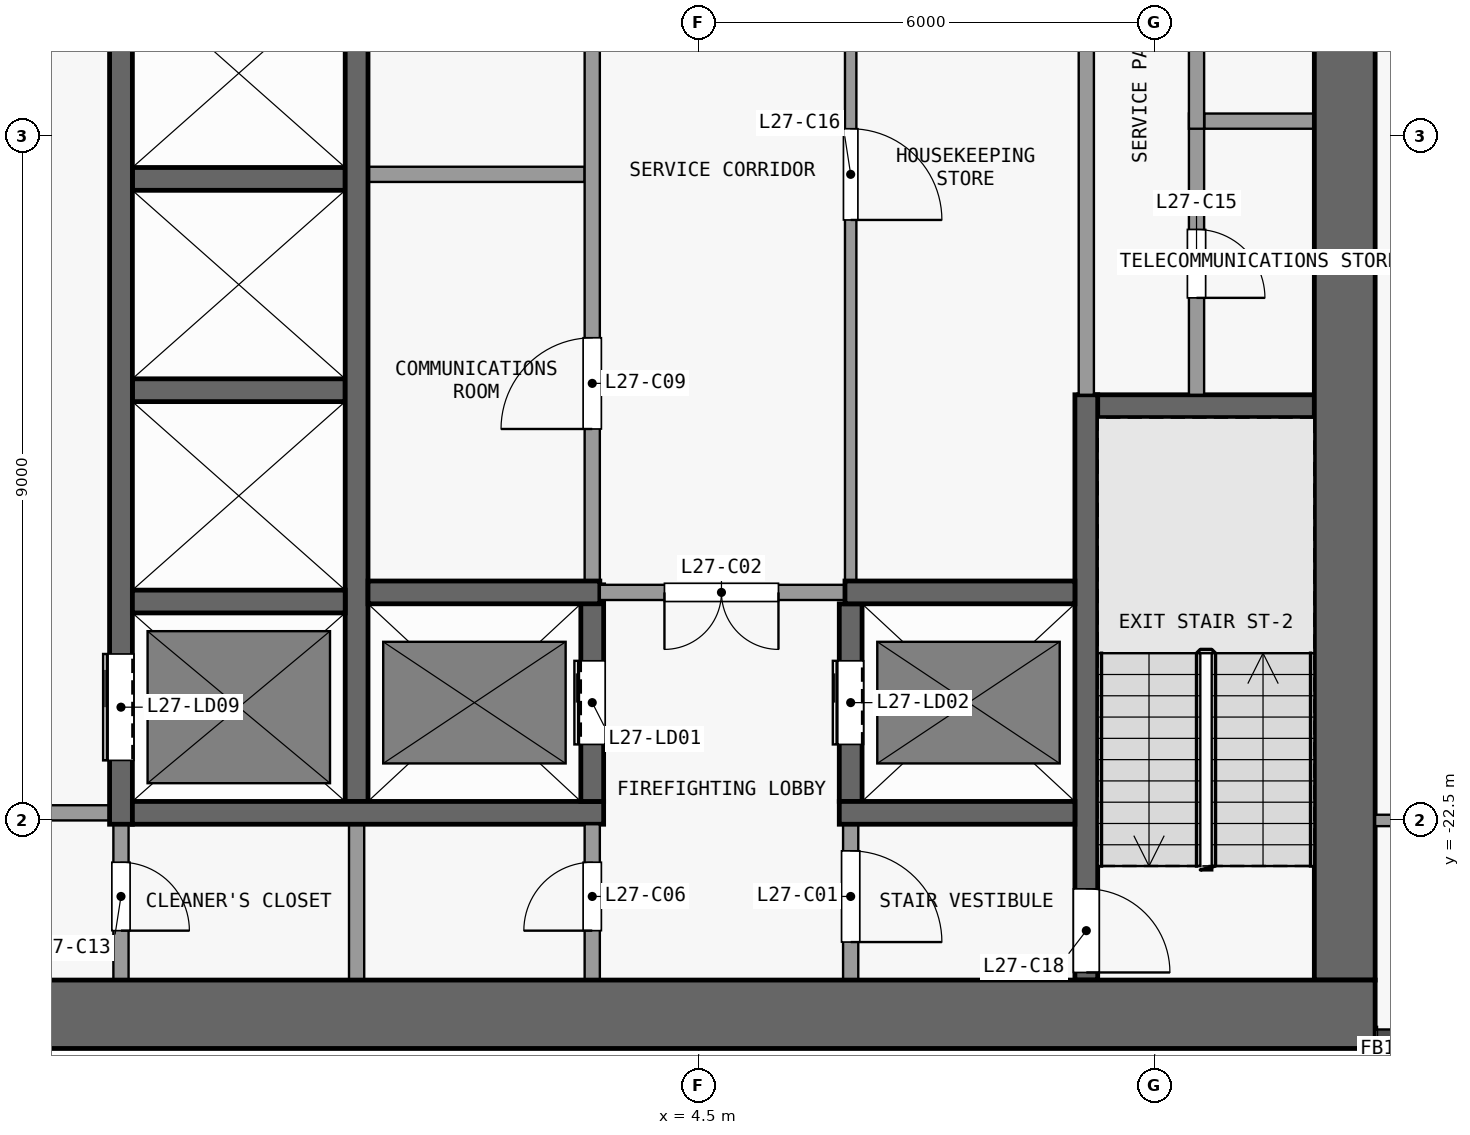
"""IFC4 building model, lengths in metres.
Left out: names, types, materials, properties, quantities, classifications, styles, units other than length and angle.
Written with IfcOpenShell. Run it as: python <this file> out.ifc"""

import sys

from ifc_helpers import new_model, si_unit, direction, frame, frame_2d, origin, place, context, subcontext, project, spatial, rectangle, extrude, element, fill, save


model = new_model("IFC4")
c1 = context("Model", 3, precision=1e-05, world=origin(), true_north=direction((0.0, 1.0)))
c2 = subcontext(c1, "Body", "Model", "MODEL_VIEW")
j1 = project(units=[si_unit("LENGTHUNIT", "METRE"), si_unit("PLANEANGLEUNIT", "RADIAN")], contexts=[c1])
p1 = place(None, origin())
s1 = spatial("IfcSite", under=j1, at=p1, CompositionType="ELEMENT")
p2 = place(p1, origin())
s2 = spatial("IfcBuilding", under=s1, at=p2, CompositionType="ELEMENT")
p3 = place(p2, frame((0.0, 0.0, 109.9)))
s3 = spatial("IfcBuildingStorey", under=s2, at=p3, CompositionType="ELEMENT", Elevation=109.9)
p4 = place(p3, frame((-13.4, -25.05, 0.0), z_axis=(0.0, 0.0, 1.0), x_axis=(1.0, 0.0, 0.0)))
e1 = element("IfcWall", 1, at=p4, inside=s3, PredefinedType="SHEAR", context=c2, shape_type="SweptSolid", body=[
    extrude(rectangle(XDim=26.8, YDim=0.9, at=frame_2d((13.4, 0.0))), origin(), (0.0, 0.0, 1.0), 3.3),
])
p5 = place(p3, frame((13.0, -24.6, 0.0), z_axis=(0.0, 0.0, 1.0), x_axis=(0.0, 1.0, 0.0)))
e2 = element("IfcWall", 2, at=p5, inside=s3, PredefinedType="SHEAR", context=c2, shape_type="SweptSolid", body=[
    extrude(rectangle(XDim=16.1, YDim=0.8, at=frame_2d((8.05, 0.0))), origin(), (0.0, 0.0, 1.0), 3.3),
])
p6 = place(p3, frame((-3.25, -22.4, 0.0), z_axis=(0.0, 0.0, 1.0), x_axis=(-1.0, 0.0, 0.0)))
e3 = element("IfcWall", 3, at=p6, inside=s3, PredefinedType="PARTITIONING", context=c2, shape_type="SweptSolid", body=[
    extrude(rectangle(XDim=3.1, YDim=0.2, at=frame_2d((1.55, 0.0))), origin(), (0.0, 0.0, 1.0), 3.3),
])
p7 = place(p6, frame((0.8, 0.0, 0.0)))
e4 = element("IfcOpeningElement", 4, at=p7, cuts=e3, PredefinedType="OPENING", context=c2, shape_type="SweptSolid", body=[
    extrude(rectangle(XDim=1.5, YDim=2.1, at=frame_2d((0.75, 1.05))), frame((0.0, 0.11, 0.0), z_axis=(0.0, -1.0, 0.0), x_axis=(1.0, 0.0, 0.0)), (0.0, 0.0, 1.0), 0.22),
])
p8 = place(p3, frame((-2.95, -22.4, 0.0), z_axis=(0.0, 0.0, 1.0), x_axis=(1.0, 0.0, 0.0)))
e5 = element("IfcWall", 5, at=p8, inside=s3, PredefinedType="SHEAR", context=c2, shape_type="SweptSolid", body=[
    extrude(rectangle(XDim=6.2, YDim=0.3, at=frame_2d((3.1, 0.0))), origin(), (0.0, 0.0, 1.0), 3.3),
])
p9 = place(p3, frame((6.35, -22.4, 0.0), z_axis=(0.0, 0.0, 1.0), x_axis=(1.0, 0.0, 0.0)))
e6 = element("IfcWall", 6, at=p9, inside=s3, PredefinedType="SHEAR", context=c2, shape_type="SweptSolid", body=[
    extrude(rectangle(XDim=3.1, YDim=0.3, at=frame_2d((1.55, 0.0))), origin(), (0.0, 0.0, 1.0), 3.3),
])
p10 = place(p3, frame((-2.95, -19.62, 0.0), z_axis=(0.0, 0.0, 1.0), x_axis=(1.0, 0.0, 0.0)))
e7 = element("IfcWall", 7, at=p10, inside=s3, PredefinedType="SHEAR", context=c2, shape_type="SweptSolid", body=[
    extrude(rectangle(XDim=2.8, YDim=0.3, at=frame_2d((1.4, 0.0))), origin(), (0.0, 0.0, 1.0), 3.3),
])
p11 = place(p3, frame((0.15, -19.5, 0.0), z_axis=(0.0, 0.0, 1.0), x_axis=(1.0, 0.0, 0.0)))
e8 = element("IfcWall", 8, at=p11, inside=s3, PredefinedType="SHEAR", context=c2, shape_type="SweptSolid", body=[
    extrude(rectangle(XDim=3.05, YDim=0.3, at=frame_2d((1.525, 0.0))), origin(), (0.0, 0.0, 1.0), 3.3),
])
p12 = place(p3, frame((6.575, -19.5, 0.0), z_axis=(0.0, 0.0, 1.0), x_axis=(-1.0, 0.0, 0.0)))
e9 = element("IfcWall", 9, at=p12, inside=s3, PredefinedType="PARTITIONING", context=c2, shape_type="SweptSolid", body=[
    extrude(rectangle(XDim=3.375, YDim=0.2, at=frame_2d((1.688, 0.0))), origin(), (0.0, 0.0, 1.0), 3.3),
])
p13 = place(p12, frame((1.025, 0.0, 0.0)))
e10 = element("IfcOpeningElement", 10, at=p13, cuts=e9, PredefinedType="OPENING", context=c2, shape_type="SweptSolid", body=[
    extrude(rectangle(XDim=1.5, YDim=2.1, at=frame_2d((0.75, 1.05))), frame((0.0, 0.11, 0.0), z_axis=(0.0, -1.0, 0.0), x_axis=(1.0, 0.0, 0.0)), (0.0, 0.0, 1.0), 0.22),
])
p14 = place(p3, frame((6.425, -19.5, 0.0), z_axis=(0.0, 0.0, 1.0), x_axis=(1.0, 0.0, 0.0)))
e11 = element("IfcWall", 11, at=p14, inside=s3, PredefinedType="SHEAR", context=c2, shape_type="SweptSolid", body=[
    extrude(rectangle(XDim=3.025, YDim=0.3, at=frame_2d((1.512, 0.0))), origin(), (0.0, 0.0, 1.0), 3.3),
])
p15 = place(p3, frame((9.5, -17.05, 0.0), z_axis=(0.0, 0.0, 1.0), x_axis=(1.0, 0.0, 0.0)))
e12 = element("IfcWall", 12, at=p15, inside=s3, PredefinedType="SHEAR", context=c2, shape_type="SweptSolid", body=[
    extrude(rectangle(XDim=3.1, YDim=0.3, at=frame_2d((1.55, 0.0))), origin(), (0.0, 0.0, 1.0), 3.3),
])
for number, where, z_axis, x_axis in (
    (13, (-2.95, -16.84, 0.0), (0.0, 0.0, 1.0), (1.0, 0.0, 0.0)),
    (14, (-2.95, -14.06, 0.0), (0.0, 0.0, 1.0), (1.0, 0.0, 0.0)),
):
    element("IfcWall", number, at=place(p3, frame(where, z_axis=z_axis, x_axis=x_axis)), inside=s3, PredefinedType="SHEAR", context=c2, shape_type="SweptSolid", body=[
        extrude(rectangle(XDim=2.8, YDim=0.3, at=frame_2d((1.4, 0.0))), origin(), (0.0, 0.0, 1.0), 3.3),
    ])
p16 = place(p3, frame((0.15, -14.0, 0.0), z_axis=(0.0, 0.0, 1.0), x_axis=(1.0, 0.0, 0.0)))
e15 = element("IfcWall", 15, at=p16, inside=s3, PredefinedType="PARTITIONING", context=c2, shape_type="SweptSolid", body=[
    extrude(rectangle(XDim=2.85, YDim=0.2, at=frame_2d((1.425, 0.0))), origin(), (0.0, 0.0, 1.0), 3.3),
])
p17 = place(p3, frame((11.15, -13.3, 0.0), z_axis=(0.0, 0.0, 1.0), x_axis=(1.0, 0.0, 0.0)))
e16 = element("IfcWall", 16, at=p17, inside=s3, PredefinedType="PARTITIONING", context=c2, shape_type="SweptSolid", body=[
    extrude(rectangle(XDim=1.45, YDim=0.2, at=frame_2d((0.725, 0.0))), origin(), (0.0, 0.0, 1.0), 3.3),
])
p18 = place(p3, frame((-3.1, -22.55, 0.0), z_axis=(0.0, 0.0, 1.0), x_axis=(0.0, -1.0, 0.0)))
e17 = element("IfcWall", 17, at=p18, inside=s3, PredefinedType="PARTITIONING", context=c2, shape_type="SweptSolid", body=[
    extrude(rectangle(XDim=2.05, YDim=0.2, at=frame_2d((1.025, 0.0))), origin(), (0.0, 0.0, 1.0), 3.3),
])
p19 = place(p18, frame((0.5, 0.0, 0.0)))
e18 = element("IfcOpeningElement", 18, at=p19, cuts=e17, PredefinedType="OPENING", context=c2, shape_type="SweptSolid", body=[
    extrude(rectangle(XDim=0.9, YDim=2.1, at=frame_2d((0.45, 1.05))), frame((0.0, 0.11, 0.0), z_axis=(0.0, -1.0, 0.0), x_axis=(1.0, 0.0, 0.0)), (0.0, 0.0, 1.0), 0.22),
])
p20 = place(p3, frame((-3.1, -22.55, 0.0), z_axis=(0.0, 0.0, 1.0), x_axis=(0.0, 1.0, 0.0)))
e19 = element("IfcWall", 19, at=p20, inside=s3, PredefinedType="SHEAR", context=c2, shape_type="SweptSolid", body=[
    extrude(rectangle(XDim=14.05, YDim=0.3, at=frame_2d((7.025, 0.0))), origin(), (0.0, 0.0, 1.0), 3.3),
])
p21 = place(p20, frame((12.11, 0.0, 0.0)))
e20 = element("IfcOpeningElement", 20, at=p21, cuts=e19, PredefinedType="OPENING", context=c2, shape_type="SweptSolid", body=[
    extrude(rectangle(XDim=1.1, YDim=2.1, at=frame_2d((0.55, 1.05))), frame((0.0, 0.16, 0.0), z_axis=(0.0, -1.0, 0.0), x_axis=(1.0, 0.0, 0.0)), (0.0, 0.0, 1.0), 0.32),
])
p22 = place(p20, frame((0.84, 0.0, 0.0)))
e21 = element("IfcOpeningElement", 21, at=p22, cuts=e19, PredefinedType="OPENING", context=c2, shape_type="SweptSolid", body=[
    extrude(rectangle(XDim=1.4, YDim=2.1, at=frame_2d((0.7, 1.05))), frame((0.0, 0.16, 0.0), z_axis=(0.0, -1.0, 0.0), x_axis=(1.0, 0.0, 0.0)), (0.0, 0.0, 1.0), 0.32),
])
p23 = place(p3, frame((0.0, -24.6, 0.0), z_axis=(0.0, 0.0, 1.0), x_axis=(0.0, 1.0, 0.0)))
e22 = element("IfcWall", 22, at=p23, inside=s3, PredefinedType="PARTITIONING", context=c2, shape_type="SweptSolid", body=[
    extrude(rectangle(XDim=2.05, YDim=0.2, at=frame_2d((1.025, 0.0))), origin(), (0.0, 0.0, 1.0), 3.3),
])
p24 = place(p3, frame((0.0, -22.25, 0.0), z_axis=(0.0, 0.0, 1.0), x_axis=(0.0, 1.0, 0.0)))
e23 = element("IfcWall", 23, at=p24, inside=s3, PredefinedType="SHEAR", context=c2, shape_type="SweptSolid", body=[
    extrude(rectangle(XDim=13.75, YDim=0.3, at=frame_2d((6.875, 0.0))), origin(), (0.0, 0.0, 1.0), 3.3),
])
p25 = place(p3, frame((3.1, -24.6, 0.0), z_axis=(0.0, 0.0, 1.0), x_axis=(0.0, 1.0, 0.0)))
e24 = element("IfcWall", 24, at=p25, inside=s3, PredefinedType="PARTITIONING", context=c2, shape_type="SweptSolid", body=[
    extrude(rectangle(XDim=2.05, YDim=0.2, at=frame_2d((1.025, 0.0))), origin(), (0.0, 0.0, 1.0), 3.3),
])
p26 = place(p25, frame((0.65, 0.0, 0.0)))
e25 = element("IfcOpeningElement", 25, at=p26, cuts=e24, PredefinedType="OPENING", context=c2, shape_type="SweptSolid", body=[
    extrude(rectangle(XDim=0.9, YDim=2.1, at=frame_2d((0.45, 1.05))), frame((0.0, 0.11, 0.0), z_axis=(0.0, -1.0, 0.0), x_axis=(1.0, 0.0, 0.0)), (0.0, 0.0, 1.0), 0.22),
])
p27 = place(p3, frame((3.1, -22.25, 0.0), z_axis=(0.0, 0.0, 1.0), x_axis=(0.0, 1.0, 0.0)))
e26 = element("IfcWall", 26, at=p27, inside=s3, PredefinedType="SHEAR", context=c2, shape_type="SweptSolid", body=[
    extrude(rectangle(XDim=2.85, YDim=0.3, at=frame_2d((1.425, 0.0))), origin(), (0.0, 0.0, 1.0), 3.3),
])
p28 = place(p27, frame((0.75, 0.0, 0.0)))
e27 = element("IfcOpeningElement", 27, at=p28, cuts=e26, PredefinedType="OPENING", context=c2, shape_type="SweptSolid", body=[
    extrude(rectangle(XDim=1.1, YDim=2.1, at=frame_2d((0.55, 1.05))), frame((0.0, 0.16, 0.0), z_axis=(0.0, -1.0, 0.0), x_axis=(1.0, 0.0, 0.0)), (0.0, 0.0, 1.0), 0.32),
])
p29 = place(p3, frame((3.1, -19.6, 0.0), z_axis=(0.0, 0.0, 1.0), x_axis=(0.0, 1.0, 0.0)))
e28 = element("IfcWall", 28, at=p29, inside=s3, PredefinedType="PARTITIONING", context=c2, shape_type="SweptSolid", body=[
    extrude(rectangle(XDim=11.1, YDim=0.2, at=frame_2d((5.55, 0.0))), origin(), (0.0, 0.0, 1.0), 3.3),
])
p30 = place(p29, frame((2.25, 0.0, 0.0)))
e29 = element("IfcOpeningElement", 29, at=p30, cuts=e28, PredefinedType="OPENING", context=c2, shape_type="SweptSolid", body=[
    extrude(rectangle(XDim=1.2, YDim=2.1, at=frame_2d((0.6, 1.05))), frame((0.0, 0.11, 0.0), z_axis=(0.0, -1.0, 0.0), x_axis=(1.0, 0.0, 0.0)), (0.0, 0.0, 1.0), 0.22),
])
p31 = place(p29, frame((7.75, 0.0, 0.0)))
e30 = element("IfcOpeningElement", 30, at=p31, cuts=e28, PredefinedType="OPENING", context=c2, shape_type="SweptSolid", body=[
    extrude(rectangle(XDim=1.2, YDim=2.1, at=frame_2d((0.6, 1.05))), frame((0.0, 0.11, 0.0), z_axis=(0.0, -1.0, 0.0), x_axis=(1.0, 0.0, 0.0)), (0.0, 0.0, 1.0), 0.22),
])
p32 = place(p3, frame((6.5, -22.55, 0.0), z_axis=(0.0, 0.0, 1.0), x_axis=(0.0, -1.0, 0.0)))
e31 = element("IfcWall", 31, at=p32, inside=s3, PredefinedType="PARTITIONING", context=c2, shape_type="SweptSolid", body=[
    extrude(rectangle(XDim=2.05, YDim=0.2, at=frame_2d((1.025, 0.0))), origin(), (0.0, 0.0, 1.0), 3.3),
])
p33 = place(p32, frame((0.35, 0.0, 0.0)))
e32 = element("IfcOpeningElement", 32, at=p33, cuts=e31, PredefinedType="OPENING", context=c2, shape_type="SweptSolid", body=[
    extrude(rectangle(XDim=1.2, YDim=2.1, at=frame_2d((0.6, 1.05))), frame((0.0, 0.11, 0.0), z_axis=(0.0, -1.0, 0.0), x_axis=(1.0, 0.0, 0.0)), (0.0, 0.0, 1.0), 0.22),
])
p34 = place(p3, frame((6.5, -22.25, 0.0), z_axis=(0.0, 0.0, 1.0), x_axis=(0.0, 1.0, 0.0)))
e33 = element("IfcWall", 33, at=p34, inside=s3, PredefinedType="SHEAR", context=c2, shape_type="SweptSolid", body=[
    extrude(rectangle(XDim=2.6, YDim=0.3, at=frame_2d((1.3, 0.0))), origin(), (0.0, 0.0, 1.0), 3.3),
])
p35 = place(p34, frame((0.75, 0.0, 0.0)))
e34 = element("IfcOpeningElement", 34, at=p35, cuts=e33, PredefinedType="OPENING", context=c2, shape_type="SweptSolid", body=[
    extrude(rectangle(XDim=1.1, YDim=2.1, at=frame_2d((0.55, 1.05))), frame((0.0, 0.16, 0.0), z_axis=(0.0, -1.0, 0.0), x_axis=(1.0, 0.0, 0.0)), (0.0, 0.0, 1.0), 0.32),
])
p36 = place(p3, frame((6.5, -8.5, 0.0), z_axis=(0.0, 0.0, 1.0), x_axis=(0.0, -1.0, 0.0)))
e35 = element("IfcWall", 35, at=p36, inside=s3, PredefinedType="PARTITIONING", context=c2, shape_type="SweptSolid", body=[
    extrude(rectangle(XDim=10.85, YDim=0.15, at=frame_2d((5.425, 0.0))), origin(), (0.0, 0.0, 1.0), 3.3),
])
p37 = place(p36, frame((4.9, 0.0, 0.0)))
e36 = element("IfcOpeningElement", 36, at=p37, cuts=e35, PredefinedType="OPENING", context=c2, shape_type="SweptSolid", body=[
    extrude(rectangle(XDim=1.2, YDim=2.1, at=frame_2d((0.6, 1.05))), frame((0.0, 0.085, 0.0), z_axis=(0.0, -1.0, 0.0), x_axis=(1.0, 0.0, 0.0)), (0.0, 0.0, 1.0), 0.17),
])
p38 = place(p3, frame((9.6, -16.9, 0.0), z_axis=(0.0, 0.0, 1.0), x_axis=(0.0, -1.0, 0.0)))
e37 = element("IfcWall", 37, at=p38, inside=s3, PredefinedType="SHEAR", context=c2, shape_type="SweptSolid", body=[
    extrude(rectangle(XDim=7.7, YDim=0.3, at=frame_2d((3.85, 0.0))), origin(), (0.0, 0.0, 1.0), 3.3),
])
p39 = place(p38, frame((6.5, 0.0, 0.0)))
e38 = element("IfcOpeningElement", 38, at=p39, cuts=e37, PredefinedType="OPENING", context=c2, shape_type="SweptSolid", body=[
    extrude(rectangle(XDim=1.1, YDim=2.1, at=frame_2d((0.55, 1.05))), frame((0.0, 0.16, 0.0), z_axis=(0.0, -1.0, 0.0), x_axis=(1.0, 0.0, 0.0)), (0.0, 0.0, 1.0), 0.32),
])
p40 = place(p3, frame((9.6, -16.9, 0.0), z_axis=(0.0, 0.0, 1.0), x_axis=(0.0, 1.0, 0.0)))
e39 = element("IfcWall", 39, at=p40, inside=s3, PredefinedType="PARTITIONING", context=c2, shape_type="SweptSolid", body=[
    extrude(rectangle(XDim=8.4, YDim=0.2, at=frame_2d((4.2, 0.0))), origin(), (0.0, 0.0, 1.0), 3.3),
])
p41 = place(p3, frame((11.05, -13.2, 0.0), z_axis=(0.0, 0.0, 1.0), x_axis=(0.0, -1.0, 0.0)))
e40 = element("IfcWall", 40, at=p41, inside=s3, PredefinedType="PARTITIONING", context=c2, shape_type="SweptSolid", body=[
    extrude(rectangle(XDim=3.7, YDim=0.2, at=frame_2d((1.85, 0.0))), origin(), (0.0, 0.0, 1.0), 3.3),
])
p42 = place(p41, frame((1.525, 0.0, 0.0)))
e41 = element("IfcOpeningElement", 41, at=p42, cuts=e40, PredefinedType="OPENING", context=c2, shape_type="SweptSolid", body=[
    extrude(rectangle(XDim=0.9, YDim=2.1, at=frame_2d((0.45, 1.05))), frame((0.0, 0.11, 0.0), z_axis=(0.0, -1.0, 0.0), x_axis=(1.0, 0.0, 0.0)), (0.0, 0.0, 1.0), 0.22),
])
p43 = place(p3, frame((11.05, -8.5, 0.0), z_axis=(0.0, 0.0, 1.0), x_axis=(0.0, -1.0, 0.0)))
e42 = element("IfcWall", 42, at=p43, inside=s3, PredefinedType="PARTITIONING", context=c2, shape_type="SweptSolid", body=[
    extrude(rectangle(XDim=4.9, YDim=0.2, at=frame_2d((2.45, 0.0))), origin(), (0.0, 0.0, 1.0), 3.3),
])
p44 = place(p43, frame((1.95, 0.0, 0.0)))
e43 = element("IfcOpeningElement", 43, at=p44, cuts=e42, PredefinedType="OPENING", context=c2, shape_type="SweptSolid", body=[
    extrude(rectangle(XDim=0.9, YDim=2.1, at=frame_2d((0.45, 1.05))), frame((0.0, 0.11, 0.0), z_axis=(0.0, -1.0, 0.0), x_axis=(1.0, 0.0, 0.0)), (0.0, 0.0, 1.0), 0.22),
])
p45 = place(p3, frame((13.4, -22.5, 0.0), z_axis=(0.0, 0.0, 1.0), x_axis=(1.0, 0.0, 0.0)))
e44 = element("IfcWall", 44, at=p45, inside=s3, PredefinedType="PARTITIONING", context=c2, shape_type="SweptSolid", body=[
    extrude(rectangle(XDim=2.925, YDim=0.15, at=frame_2d((1.462, 0.0))), origin(), (0.0, 0.0, 1.0), 3.3),
])
p46 = place(p45, frame((1.0, 0.0, 0.0)))
e45 = element("IfcOpeningElement", 45, at=p46, cuts=e44, PredefinedType="OPENING", context=c2, shape_type="SweptSolid", body=[
    extrude(rectangle(XDim=0.9, YDim=2.1, at=frame_2d((0.45, 1.05))), frame((0.0, 0.085, 0.0), z_axis=(0.0, -1.0, 0.0), x_axis=(1.0, 0.0, 0.0)), (0.0, 0.0, 1.0), 0.17),
])
p47 = place(p28, origin())
e46 = element("IfcDoor", 46, at=p47, inside=s3, OperationType="DOUBLE_DOOR_SLIDING", PredefinedType="DOOR", context=c2, shape_type="SweptSolid", body=[
    extrude(rectangle(XDim=1.1, YDim=2.1, at=frame_2d((0.55, 1.05))), frame((0.0, 0.025, 0.0), z_axis=(0.0, -1.0, 0.0), x_axis=(1.0, 0.0, 0.0)), (0.0, 0.0, 1.0), 0.05),
])
fill(e27, e46)
p48 = place(p35, origin())
e47 = element("IfcDoor", 47, at=p48, inside=s3, OperationType="DOUBLE_DOOR_SLIDING", PredefinedType="DOOR", context=c2, shape_type="SweptSolid", body=[
    extrude(rectangle(XDim=1.1, YDim=2.1, at=frame_2d((0.55, 1.05))), frame((0.0, 0.025, 0.0), z_axis=(0.0, -1.0, 0.0), x_axis=(1.0, 0.0, 0.0)), (0.0, 0.0, 1.0), 0.05),
])
fill(e34, e47)
p49 = place(p22, origin())
e48 = element("IfcDoor", 48, at=p49, inside=s3, OperationType="DOUBLE_DOOR_SLIDING", PredefinedType="DOOR", context=c2, shape_type="SweptSolid", body=[
    extrude(rectangle(XDim=1.4, YDim=2.1, at=frame_2d((0.7, 1.05))), frame((0.0, 0.025, 0.0), z_axis=(0.0, -1.0, 0.0), x_axis=(1.0, 0.0, 0.0)), (0.0, 0.0, 1.0), 0.05),
])
fill(e21, e48)
p50 = place(p33, origin())
e49 = element("IfcDoor", 49, at=p50, inside=s3, OperationType="SINGLE_SWING_RIGHT", PredefinedType="DOOR", context=c2, shape_type="SweptSolid", body=[
    extrude(rectangle(XDim=1.2, YDim=2.1, at=frame_2d((0.6, 1.05))), frame((0.0, 0.025, 0.0), z_axis=(0.0, -1.0, 0.0), x_axis=(1.0, 0.0, 0.0)), (0.0, 0.0, 1.0), 0.05),
])
fill(e32, e49)
p51 = place(p13, origin())
e50 = element("IfcDoor", 50, at=p51, inside=s3, OperationType="DOUBLE_DOOR_SINGLE_SWING", PredefinedType="DOOR", context=c2, shape_type="SweptSolid", body=[
    extrude(rectangle(XDim=1.5, YDim=2.1, at=frame_2d((0.75, 1.05))), frame((0.0, 0.025, 0.0), z_axis=(0.0, -1.0, 0.0), x_axis=(1.0, 0.0, 0.0)), (0.0, 0.0, 1.0), 0.05),
])
fill(e10, e50)
p52 = place(p26, origin())
e51 = element("IfcDoor", 51, at=p52, inside=s3, OperationType="SINGLE_SWING_LEFT", PredefinedType="DOOR", context=c2, shape_type="SweptSolid", body=[
    extrude(rectangle(XDim=0.9, YDim=2.1, at=frame_2d((0.45, 1.05))), frame((0.0, 0.025, 0.0), z_axis=(0.0, -1.0, 0.0), x_axis=(1.0, 0.0, 0.0)), (0.0, 0.0, 1.0), 0.05),
])
fill(e25, e51)
p53 = place(p30, origin())
e52 = element("IfcDoor", 52, at=p53, inside=s3, OperationType="SINGLE_SWING_LEFT", PredefinedType="DOOR", context=c2, shape_type="SweptSolid", body=[
    extrude(rectangle(XDim=1.2, YDim=2.1, at=frame_2d((0.6, 1.05))), frame((0.0, 0.025, 0.0), z_axis=(0.0, -1.0, 0.0), x_axis=(1.0, 0.0, 0.0)), (0.0, 0.0, 1.0), 0.05),
])
fill(e29, e52)
p54 = place(p19, origin())
e53 = element("IfcDoor", 53, at=p54, inside=s3, OperationType="SINGLE_SWING_RIGHT", PredefinedType="DOOR", context=c2, shape_type="SweptSolid", body=[
    extrude(rectangle(XDim=0.9, YDim=2.1, at=frame_2d((0.45, 1.05))), frame((0.0, 0.025, 0.0), z_axis=(0.0, -1.0, 0.0), x_axis=(1.0, 0.0, 0.0)), (0.0, 0.0, 1.0), 0.05),
])
fill(e18, e53)
p55 = place(p42, origin())
e54 = element("IfcDoor", 54, at=p55, inside=s3, OperationType="SINGLE_SWING_RIGHT", PredefinedType="DOOR", context=c2, shape_type="SweptSolid", body=[
    extrude(rectangle(XDim=0.9, YDim=2.1, at=frame_2d((0.45, 1.05))), frame((0.0, 0.025, 0.0), z_axis=(0.0, -1.0, 0.0), x_axis=(1.0, 0.0, 0.0)), (0.0, 0.0, 1.0), 0.05),
])
fill(e41, e54)
p56 = place(p37, origin())
e55 = element("IfcDoor", 55, at=p56, inside=s3, OperationType="SINGLE_SWING_RIGHT", PredefinedType="DOOR", context=c2, shape_type="SweptSolid", body=[
    extrude(rectangle(XDim=1.2, YDim=2.1, at=frame_2d((0.6, 1.05))), frame((0.0, 0.025, 0.0), z_axis=(0.0, -1.0, 0.0), x_axis=(1.0, 0.0, 0.0)), (0.0, 0.0, 1.0), 0.05),
])
fill(e36, e55)
p57 = place(p39, origin())
e56 = element("IfcDoor", 56, at=p57, inside=s3, OperationType="SINGLE_SWING_RIGHT", PredefinedType="DOOR", context=c2, shape_type="SweptSolid", body=[
    extrude(rectangle(XDim=1.1, YDim=2.1, at=frame_2d((0.55, 1.05))), frame((0.0, 0.025, 0.0), z_axis=(0.0, -1.0, 0.0), x_axis=(1.0, 0.0, 0.0)), (0.0, 0.0, 1.0), 0.05),
])
fill(e38, e56)
save(model, sys.argv[1])
